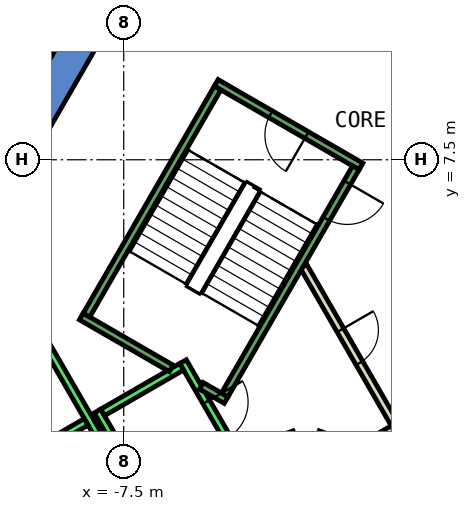
"""IFC4 building model, lengths in metres.
Left out: names, types, materials, properties, quantities, classifications, styles, units other than length and angle.
Written with IfcOpenShell. Run it as: python <this file> out.ifc"""

import sys

from ifc_helpers import new_model, si_unit, direction, frame, frame_2d, origin, place, context, subcontext, project, spatial, polyline, rectangle, outline, extrude, element, fill, save


model = new_model("IFC4")
c1 = context("Model", 3, precision=1e-05, world=origin(), true_north=direction((0.0, 1.0)))
c2 = subcontext(c1, "Body", "Model", "MODEL_VIEW")
j1 = project(units=[si_unit("LENGTHUNIT", "METRE"), si_unit("PLANEANGLEUNIT", "RADIAN")], contexts=[c1])
p1 = place(None, origin())
s1 = spatial("IfcSite", under=j1, at=p1, CompositionType="ELEMENT")
p2 = place(p1, origin())
s2 = spatial("IfcBuilding", under=s1, at=p2, CompositionType="ELEMENT")
p3 = place(p2, frame((0.0, 0.0, 86.6)))
s3 = spatial("IfcBuildingStorey", under=s2, at=p3, CompositionType="ELEMENT", Elevation=86.6)
p4 = place(p3, frame((0.0, 0.0, -0.6)))
e1 = element("IfcWall", 1, at=p4, inside=s3, PredefinedType="SHEAR", context=c2, shape_type="SweptSolid", body=[
    extrude(outline(polyline([(-12.267, 5.252), (-11.488, 4.802), (-6.409, 13.6), (-6.928, 14.5), (-12.267, 5.252)])), origin(), (0.0, 0.0, 1.0), 4.4),
])
p5 = place(p3, frame((0.0, 0.0, -0.6)))
e2 = element("IfcWall", 2, at=p5, inside=s3, PredefinedType="SHEAR", context=c2, shape_type="SweptSolid", body=[
    extrude(outline(polyline([(-13.856, 2.5), (-6.928, -9.5), (-6.409, -8.6), (-12.817, 2.5), (-13.856, 2.5)])), origin(), (0.0, 0.0, 1.0), 4.4),
])
p6 = place(p3, frame((-0.52, -1.0, 0.0), z_axis=(0.0, 0.0, 1.0), x_axis=(0.50011622646, 0.865958290007, 0.0)))
e3 = element("IfcWall", 3, at=p6, inside=s3, PredefinedType="PARTITIONING", context=c2, shape_type="SweptSolid", body=[
    extrude(rectangle(XDim=4.991, YDim=0.2, at=frame_2d((2.496, 0.0))), origin(), (0.0, 0.0, 1.0), 3.8),
])
p7 = place(p6, frame((1.945, 0.0, 0.0)))
e4 = element("IfcOpeningElement", 4, at=p7, cuts=e3, PredefinedType="OPENING", context=c2, shape_type="SweptSolid", body=[
    extrude(rectangle(XDim=1.0, YDim=2.1, at=frame_2d((0.5, 1.05))), frame((0.0, 0.11, 0.0), z_axis=(0.0, -1.0, 0.0), x_axis=(1.0, 0.0, 0.0)), (0.0, 0.0, 1.0), 0.22),
])
p8 = place(p3, frame((-2.771, 4.7, 0.0), z_axis=(0.0, 0.0, 1.0), x_axis=(0.499969479948, -0.866043023828, 0.0)))
e5 = element("IfcWall", 5, at=p8, inside=s3, PredefinedType="PARTITIONING", context=c2, shape_type="SweptSolid", body=[
    extrude(rectangle(XDim=4.99, YDim=0.2, at=frame_2d((2.495, 0.0))), origin(), (0.0, 0.0, 1.0), 3.8),
])
p9 = place(p8, frame((1.945, 0.0, 0.0)))
e6 = element("IfcOpeningElement", 6, at=p9, cuts=e5, PredefinedType="OPENING", context=c2, shape_type="SweptSolid", body=[
    extrude(rectangle(XDim=1.0, YDim=2.1, at=frame_2d((0.5, 1.05))), frame((0.0, 0.11, 0.0), z_axis=(0.0, -1.0, 0.0), x_axis=(1.0, 0.0, 0.0)), (0.0, 0.0, 1.0), 0.22),
])
p10 = place(p3, frame((-0.412, 0.414, 0.0), z_axis=(0.0, 0.0, 1.0), x_axis=(-0.866017369001, -0.500013916395, 0.0)))
e7 = element("IfcWall", 7, at=p10, inside=s3, PredefinedType="PARTITIONING", context=c2, shape_type="SweptSolid", body=[
    extrude(rectangle(XDim=1.45, YDim=0.2, at=frame_2d((0.725, 0.0))), origin(), (0.0, 0.0, 1.0), 3.8),
])
p11 = place(p3, frame((-2.07, 0.16, 0.0), z_axis=(0.0, 0.0, 1.0), x_axis=(-0.942199461132, 0.335052496547, 0.0)))
e8 = element("IfcWall", 8, at=p11, inside=s3, PredefinedType="PARTITIONING", context=c2, shape_type="SweptSolid", body=[
    extrude(rectangle(XDim=0.337, YDim=0.2, at=frame_2d((0.169, 0.0))), origin(), (0.0, 0.0, 1.0), 3.8),
])
p12 = place(p3, frame((-3.012, 0.273, 0.0), z_axis=(0.0, 0.0, 1.0), x_axis=(-0.942280615813, -0.334824194261, 0.0)))
e9 = element("IfcWall", 9, at=p12, inside=s3, PredefinedType="PARTITIONING", context=c2, shape_type="SweptSolid", body=[
    extrude(rectangle(XDim=0.338, YDim=0.2, at=frame_2d((0.169, 0.0))), origin(), (0.0, 0.0, 1.0), 3.8),
])
p13 = place(p3, frame((-5.94, 2.188, 0.0), z_axis=(0.0, 0.0, 1.0), x_axis=(0.49994636267, -0.866056369097, 0.0)))
e10 = element("IfcWall", 10, at=p13, inside=s3, PredefinedType="STANDARD", context=c2, shape_type="SweptSolid", body=[
    extrude(rectangle(XDim=2.8, YDim=0.2, at=frame_2d((1.4, 0.0))), origin(), (0.0, 0.0, 1.0), 3.8),
])
p14 = place(p13, frame((1.225, 0.0, 0.0)))
e11 = element("IfcOpeningElement", 11, at=p14, cuts=e10, PredefinedType="OPENING", context=c2, shape_type="SweptSolid", body=[
    extrude(rectangle(XDim=1.1, YDim=2.1, at=frame_2d((0.55, 1.05))), frame((0.0, 0.11, 0.0), z_axis=(0.0, -1.0, 0.0), x_axis=(1.0, 0.0, 0.0)), (0.0, 0.0, 1.0), 0.22),
])
p15 = place(p3, frame((-8.192, 0.888, 0.0), z_axis=(0.0, 0.0, 1.0), x_axis=(0.49994636267, -0.866056369097, 0.0)))
e12 = element("IfcWall", 12, at=p15, inside=s3, PredefinedType="STANDARD", context=c2, shape_type="SweptSolid", body=[
    extrude(rectangle(XDim=2.8, YDim=0.2, at=frame_2d((1.4, 0.0))), origin(), (0.0, 0.0, 1.0), 3.8),
])
p16 = place(p3, frame((-5.977, 2.052, 0.0), z_axis=(0.0, 0.0, 1.0), x_axis=(-0.865973769406, -0.500089422704, 0.0)))
e13 = element("IfcWall", 13, at=p16, inside=s3, PredefinedType="STANDARD", context=c2, shape_type="SweptSolid", body=[
    extrude(rectangle(XDim=2.399, YDim=0.2, at=frame_2d((1.2, 0.0))), origin(), (0.0, 0.0, 1.0), 3.8),
])
p17 = place(p3, frame((-9.751, 2.99, 0.0), z_axis=(0.0, 0.0, 1.0), x_axis=(0.50000090737, -0.866024879913, 0.0)))
e14 = element("IfcWall", 14, at=p17, inside=s3, PredefinedType="STANDARD", context=c2, shape_type="SweptSolid", body=[
    extrude(rectangle(XDim=10.6, YDim=0.2, at=frame_2d((5.3, 0.0))), origin(), (0.0, 0.0, 1.0), 3.8),
])
p18 = place(p3, frame((-8.488, 0.602, 0.0), z_axis=(0.0, 0.0, 1.0), x_axis=(-0.866022959057, -0.500004234368, 0.0)))
e15 = element("IfcWall", 15, at=p18, inside=s3, PredefinedType="STANDARD", context=c2, shape_type="SweptSolid", body=[
    extrude(rectangle(XDim=2.5, YDim=0.2, at=frame_2d((1.25, 0.0))), origin(), (0.0, 0.0, 1.0), 3.8),
])
p19 = place(p3, frame((-1.256, 7.324, 0.0), z_axis=(0.0, 0.0, 1.0), x_axis=(-0.866046073146, 0.499964197906, 0.0)))
e16 = element("IfcWall", 16, at=p19, inside=s3, PredefinedType="STANDARD", context=c2, shape_type="SweptSolid", body=[
    extrude(rectangle(XDim=4.4, YDim=0.2, at=frame_2d((2.2, 0.0))), origin(), (0.0, 0.0, 1.0), 3.8),
])
p20 = place(p19, frame((1.65, 0.0, 0.0)))
e17 = element("IfcOpeningElement", 17, at=p20, cuts=e16, PredefinedType="OPENING", context=c2, shape_type="SweptSolid", body=[
    extrude(rectangle(XDim=1.1, YDim=2.2, at=frame_2d((0.55, 1.1))), frame((0.0, 0.11, 0.0), z_axis=(0.0, -1.0, 0.0), x_axis=(1.0, 0.0, 0.0)), (0.0, 0.0, 1.0), 0.22),
])
p21 = place(p3, frame((-6.25, 2.01, 0.0), z_axis=(0.0, 0.0, 1.0), x_axis=(-0.86611865017, 0.499838457731, 0.0)))
e18 = element("IfcWall", 18, at=p21, inside=s3, PredefinedType="STANDARD", context=c2, shape_type="SweptSolid", body=[
    extrude(rectangle(XDim=2.733, YDim=0.2, at=frame_2d((1.366, 0.0))), origin(), (0.0, 0.0, 1.0), 3.8),
])
p22 = place(p3, frame((-4.806, 1.176, 0.0), z_axis=(0.0, 0.0, 1.0), x_axis=(-0.866558586415, 0.499075361355, 0.0)))
e19 = element("IfcWall", 19, at=p22, inside=s3, PredefinedType="STANDARD", context=c2, shape_type="SweptSolid", body=[
    extrude(rectangle(XDim=0.751, YDim=0.2, at=frame_2d((0.376, 0.0))), origin(), (0.0, 0.0, 1.0), 3.8),
])
p23 = place(p3, frame((-1.393, 7.288, 0.0), z_axis=(0.0, 0.0, 1.0), x_axis=(-0.499963383562, -0.866046543262, 0.0)))
e20 = element("IfcWall", 20, at=p23, inside=s3, PredefinedType="STANDARD", context=c2, shape_type="SweptSolid", body=[
    extrude(rectangle(XDim=6.9, YDim=0.2, at=frame_2d((3.45, 0.0))), origin(), (0.0, 0.0, 1.0), 3.8),
])
p24 = place(p23, frame((0.45, 0.0, 0.0)))
e21 = element("IfcOpeningElement", 21, at=p24, cuts=e20, PredefinedType="OPENING", context=c2, shape_type="SweptSolid", body=[
    extrude(rectangle(XDim=1.1, YDim=2.2, at=frame_2d((0.55, 1.1))), frame((0.0, 0.11, 0.0), z_axis=(0.0, -1.0, 0.0), x_axis=(1.0, 0.0, 0.0)), (0.0, 0.0, 1.0), 0.22),
])
p25 = place(p3, frame((-5.03, 9.388, 0.0), z_axis=(0.0, 0.0, 1.0), x_axis=(-0.499978703459, -0.866037698999, 0.0)))
e22 = element("IfcWall", 22, at=p25, inside=s3, PredefinedType="STANDARD", context=c2, shape_type="SweptSolid", body=[
    extrude(rectangle(XDim=6.9, YDim=0.2, at=frame_2d((3.45, 0.0))), origin(), (0.0, 0.0, 1.0), 3.8),
])
p26 = place(p9, origin())
e23 = element("IfcDoor", 23, at=p26, inside=s3, OperationType="SINGLE_SWING_RIGHT", PredefinedType="DOOR", context=c2, shape_type="SweptSolid", body=[
    extrude(rectangle(XDim=1.0, YDim=2.1, at=frame_2d((0.5, 1.05))), frame((0.0, 0.025, 0.0), z_axis=(0.0, -1.0, 0.0), x_axis=(1.0, 0.0, 0.0)), (0.0, 0.0, 1.0), 0.05),
])
fill(e6, e23)
p27 = place(p14, origin())
e24 = element("IfcDoor", 24, at=p27, inside=s3, OperationType="SLIDING_TO_LEFT", PredefinedType="DOOR", context=c2, shape_type="SweptSolid", body=[
    extrude(rectangle(XDim=1.1, YDim=2.1, at=frame_2d((0.55, 1.05))), frame((0.0, 0.025, 0.0), z_axis=(0.0, -1.0, 0.0), x_axis=(1.0, 0.0, 0.0)), (0.0, 0.0, 1.0), 0.05),
])
fill(e11, e24)
p28 = place(p24, origin())
e25 = element("IfcDoor", 25, at=p28, inside=s3, OperationType="SINGLE_SWING_LEFT", PredefinedType="DOOR", context=c2, shape_type="SweptSolid", body=[
    extrude(rectangle(XDim=1.1, YDim=2.2, at=frame_2d((0.55, 1.1))), frame((0.0, 0.025, 0.0), z_axis=(0.0, -1.0, 0.0), x_axis=(1.0, 0.0, 0.0)), (0.0, 0.0, 1.0), 0.05),
])
fill(e21, e25)
p29 = place(p20, origin())
e26 = element("IfcDoor", 26, at=p29, inside=s3, OperationType="SINGLE_SWING_LEFT", PredefinedType="DOOR", context=c2, shape_type="SweptSolid", body=[
    extrude(rectangle(XDim=1.1, YDim=2.2, at=frame_2d((0.55, 1.1))), frame((0.0, 0.025, 0.0), z_axis=(0.0, -1.0, 0.0), x_axis=(1.0, 0.0, 0.0)), (0.0, 0.0, 1.0), 0.05),
])
fill(e17, e26)
save(model, sys.argv[1])
